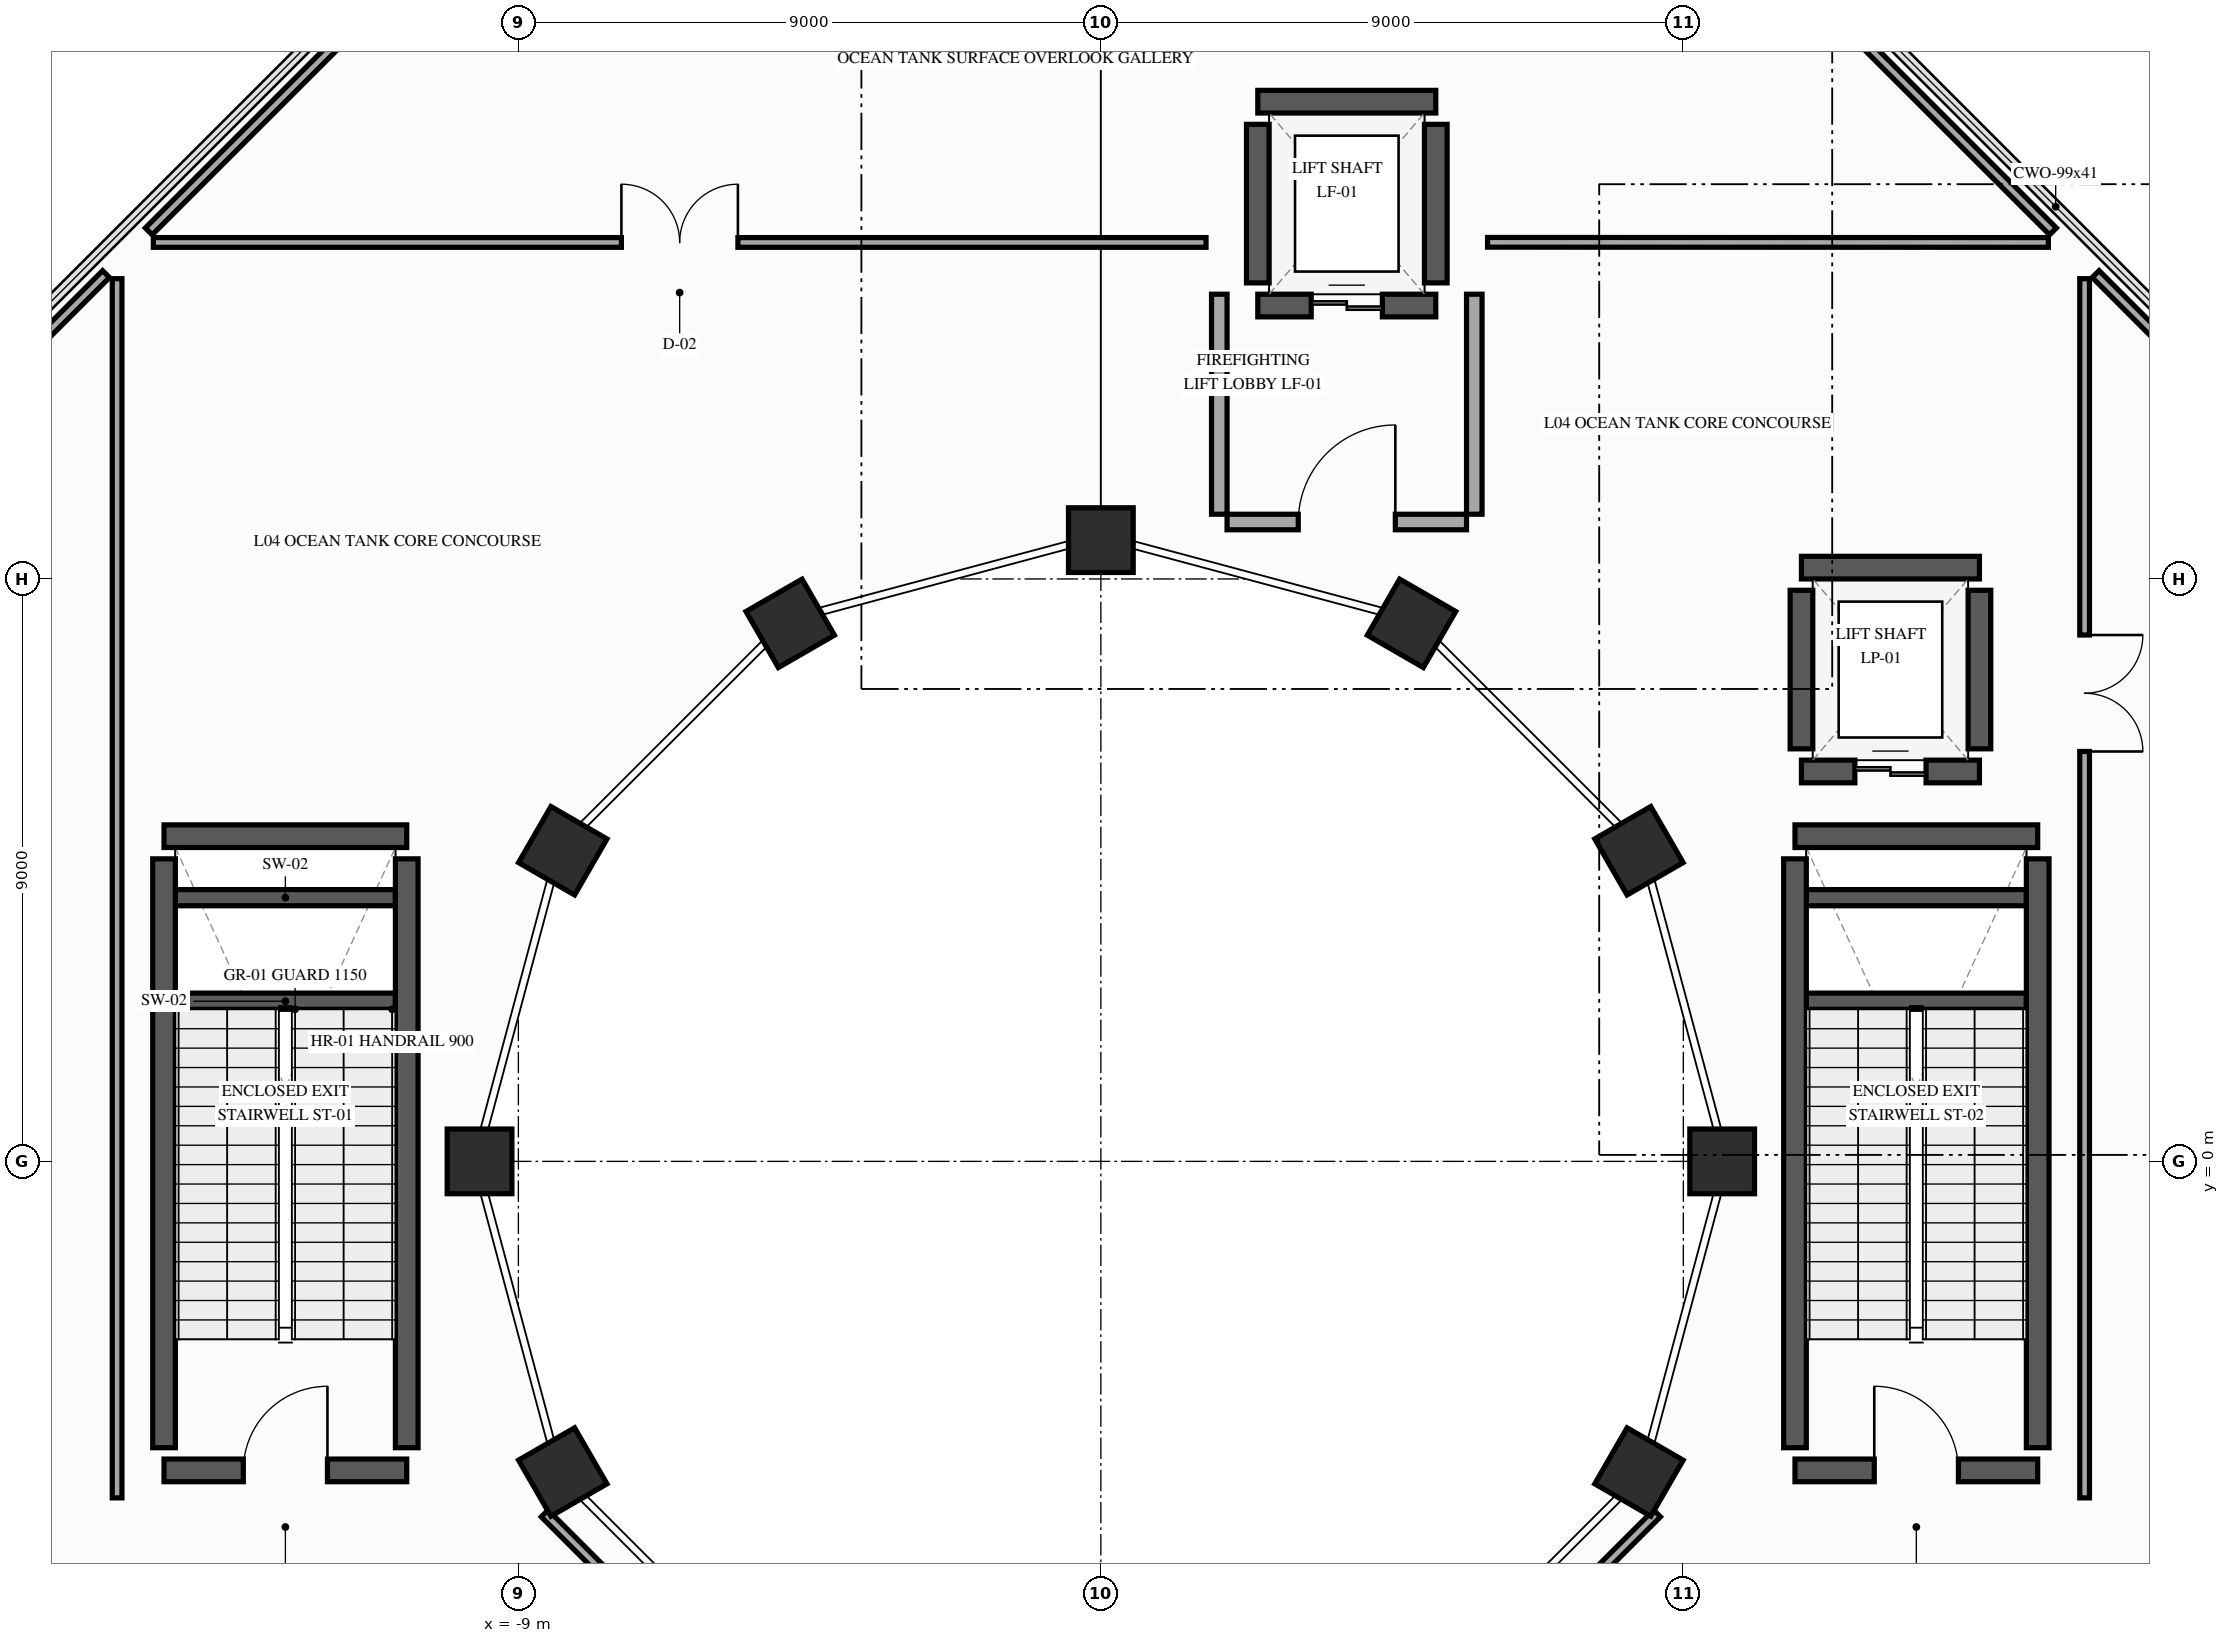
"""IFC4 building model, lengths in metres.
Left out: names, types, materials, properties, quantities, classifications, styles, units other than length and angle.
Written with IfcOpenShell. Run it as: python <this file> out.ifc"""

import sys

from ifc_helpers import new_model, si_unit, direction, frame, frame_2d, origin, origin_2d, place, context, subcontext, project, spatial, rectangle, extrude, element, fill, save


model = new_model("IFC4")
c1 = context("Model", 3, precision=1e-05, world=origin(), true_north=direction((0.0, 1.0)))
c2 = subcontext(c1, "Body", "Model", "MODEL_VIEW")
j1 = project(units=[si_unit("LENGTHUNIT", "METRE"), si_unit("PLANEANGLEUNIT", "RADIAN")], contexts=[c1])
p1 = place(None, origin())
s1 = spatial("IfcSite", under=j1, at=p1, CompositionType="ELEMENT")
p2 = place(p1, origin())
s2 = spatial("IfcBuilding", under=s1, at=p2, CompositionType="ELEMENT")
p3 = place(p2, frame((0.0, 0.0, 21.6)))
s3 = spatial("IfcBuildingStorey", under=s2, at=p3, CompositionType="ELEMENT", Elevation=21.6)
for number, where, z_axis, x_axis in (
    (1, (9.6, 0.0, 0.0), (0.0, 0.0, 1.0), (1.0, 0.0, 0.0)),
    (2, (8.314, 4.8, 0.0), (0.0, 0.0, 1.0), (0.866, 0.5, 0.0)),
    (3, (4.8, 8.314, 0.0), (0.0, 0.0, 1.0), (0.5, 0.866, 0.0)),
    (4, (0.0, 9.6, 0.0), (0.0, 0.0, 1.0), (0.0, 1.0, 0.0)),
    (5, (-4.8, 8.314, 0.0), (0.0, 0.0, 1.0), (-0.5, 0.866, 0.0)),
    (6, (-8.314, 4.8, 0.0), (0.0, 0.0, 1.0), (-0.866, 0.5, 0.0)),
    (7, (-9.6, 0.0, 0.0), (0.0, 0.0, 1.0), (-1.0, 0.0, 0.0)),
    (8, (-8.314, -4.8, 0.0), (0.0, 0.0, 1.0), (-0.866, -0.5, 0.0)),
    (9, (8.314, -4.8, 0.0), (0.0, 0.0, 1.0), (0.866, -0.5, 0.0)),
):
    element("IfcColumn", number, at=place(p3, frame(where, z_axis=z_axis, x_axis=x_axis)), inside=s3, PredefinedType="COLUMN", context=c2, shape_type="SweptSolid", body=[
        extrude(rectangle(XDim=1.0, YDim=1.0, at=origin_2d()), origin(), (0.0, 0.0, 1.0), 5.4),
    ])
for number, where, z_axis, x_axis in (
    (10, (-14.3, 2.475, 0.0), (0.0, 0.0, 1.0), (1.0, 0.0, 0.0)),
    (11, (-14.3, 4.075, 0.0), (0.0, 0.0, 1.0), (1.0, 0.0, 0.0)),
):
    element("IfcWall", number, at=place(p3, frame(where, z_axis=z_axis, x_axis=x_axis)), inside=s3, PredefinedType="SHEAR", context=c2, shape_type="SweptSolid", body=[
        extrude(rectangle(XDim=3.4, YDim=0.25, at=frame_2d((1.7, 0.0))), origin(), (0.0, 0.0, 1.0), 2.5),
    ])
p4 = place(p3, frame((-14.475, -4.775, 0.0), z_axis=(0.0, 0.0, 1.0), x_axis=(1.0, 0.0, 0.0)))
e12 = element("IfcWall", 12, at=p4, inside=s3, PredefinedType="SHEAR", context=c2, shape_type="SweptSolid", body=[
    extrude(rectangle(XDim=3.75, YDim=0.35, at=frame_2d((1.875, 0.0))), origin(), (0.0, 0.0, 1.0), 5.15),
])
p5 = place(p4, frame((1.225, 0.0, 0.0)))
e13 = element("IfcOpeningElement", 13, at=p5, cuts=e12, PredefinedType="OPENING", context=c2, shape_type="SweptSolid", body=[
    extrude(rectangle(XDim=1.3, YDim=2.2, at=frame_2d((0.65, 1.1))), frame((0.0, 0.185, 0.0), z_axis=(0.0, -1.0, 0.0), x_axis=(1.0, 0.0, 0.0)), (0.0, 0.0, 1.0), 0.37),
])
p6 = place(p3, frame((-14.475, 5.025, 0.0), z_axis=(0.0, 0.0, 1.0), x_axis=(1.0, 0.0, 0.0)))
e14 = element("IfcWall", 14, at=p6, inside=s3, PredefinedType="SHEAR", context=c2, shape_type="SweptSolid", body=[
    extrude(rectangle(XDim=3.75, YDim=0.35, at=frame_2d((1.875, 0.0))), origin(), (0.0, 0.0, 1.0), 5.15),
])
for number, where, z_axis, x_axis in (
    (15, (-14.475, -4.425, 0.0), (0.0, 0.0, 1.0), (0.0, 1.0, 0.0)),
    (16, (-10.725, -4.425, 0.0), (0.0, 0.0, 1.0), (0.0, 1.0, 0.0)),
):
    element("IfcWall", number, at=place(p3, frame(where, z_axis=z_axis, x_axis=x_axis)), inside=s3, PredefinedType="SHEAR", context=c2, shape_type="SweptSolid", body=[
        extrude(rectangle(XDim=9.1, YDim=0.35, at=frame_2d((4.55, 0.0))), origin(), (0.0, 0.0, 1.0), 5.15),
    ])
for number, where, z_axis, x_axis in (
    (17, (10.9, 2.475, 0.0), (0.0, 0.0, 1.0), (1.0, 0.0, 0.0)),
    (18, (10.9, 4.075, 0.0), (0.0, 0.0, 1.0), (1.0, 0.0, 0.0)),
):
    element("IfcWall", number, at=place(p3, frame(where, z_axis=z_axis, x_axis=x_axis)), inside=s3, PredefinedType="SHEAR", context=c2, shape_type="SweptSolid", body=[
        extrude(rectangle(XDim=3.4, YDim=0.25, at=frame_2d((1.7, 0.0))), origin(), (0.0, 0.0, 1.0), 2.5),
    ])
p7 = place(p3, frame((10.725, -4.775, 0.0), z_axis=(0.0, 0.0, 1.0), x_axis=(1.0, 0.0, 0.0)))
e19 = element("IfcWall", 19, at=p7, inside=s3, PredefinedType="SHEAR", context=c2, shape_type="SweptSolid", body=[
    extrude(rectangle(XDim=3.75, YDim=0.35, at=frame_2d((1.875, 0.0))), origin(), (0.0, 0.0, 1.0), 5.15),
])
p8 = place(p7, frame((1.225, 0.0, 0.0)))
e20 = element("IfcOpeningElement", 20, at=p8, cuts=e19, PredefinedType="OPENING", context=c2, shape_type="SweptSolid", body=[
    extrude(rectangle(XDim=1.3, YDim=2.2, at=frame_2d((0.65, 1.1))), frame((0.0, 0.185, 0.0), z_axis=(0.0, -1.0, 0.0), x_axis=(1.0, 0.0, 0.0)), (0.0, 0.0, 1.0), 0.37),
])
p9 = place(p3, frame((10.725, 5.025, 0.0), z_axis=(0.0, 0.0, 1.0), x_axis=(1.0, 0.0, 0.0)))
e21 = element("IfcWall", 21, at=p9, inside=s3, PredefinedType="SHEAR", context=c2, shape_type="SweptSolid", body=[
    extrude(rectangle(XDim=3.75, YDim=0.35, at=frame_2d((1.875, 0.0))), origin(), (0.0, 0.0, 1.0), 5.15),
])
for number, where, z_axis, x_axis in (
    (22, (10.725, -4.425, 0.0), (0.0, 0.0, 1.0), (0.0, 1.0, 0.0)),
    (23, (14.475, -4.425, 0.0), (0.0, 0.0, 1.0), (0.0, 1.0, 0.0)),
):
    element("IfcWall", number, at=place(p3, frame(where, z_axis=z_axis, x_axis=x_axis)), inside=s3, PredefinedType="SHEAR", context=c2, shape_type="SweptSolid", body=[
        extrude(rectangle(XDim=9.1, YDim=0.35, at=frame_2d((4.55, 0.0))), origin(), (0.0, 0.0, 1.0), 5.15),
    ])
p10 = place(p3, frame((2.425, 13.225, 0.0), z_axis=(0.0, 0.0, 1.0), x_axis=(1.0, 0.0, 0.0)))
e24 = element("IfcWall", 24, at=p10, inside=s3, PredefinedType="SHEAR", context=c2, shape_type="SweptSolid", body=[
    extrude(rectangle(XDim=2.75, YDim=0.35, at=frame_2d((1.375, 0.0))), origin(), (0.0, 0.0, 1.0), 5.15),
])
p11 = place(p10, frame((0.825, 0.0, 0.0)))
e25 = element("IfcOpeningElement", 25, at=p11, cuts=e24, PredefinedType="OPENING", context=c2, shape_type="SweptSolid", body=[
    extrude(rectangle(XDim=1.1, YDim=2.2, at=frame_2d((0.55, 1.1))), frame((0.0, 0.185, 0.0), z_axis=(0.0, -1.0, 0.0), x_axis=(1.0, 0.0, 0.0)), (0.0, 0.0, 1.0), 0.37),
])
p12 = place(p3, frame((5.175, 16.375, 0.0), z_axis=(0.0, 0.0, 1.0), x_axis=(-1.0, 0.0, 0.0)))
e26 = element("IfcWall", 26, at=p12, inside=s3, PredefinedType="SHEAR", context=c2, shape_type="SweptSolid", body=[
    extrude(rectangle(XDim=2.75, YDim=0.35, at=frame_2d((1.375, 0.0))), origin(), (0.0, 0.0, 1.0), 5.15),
])
for number, where, z_axis, x_axis in (
    (27, (2.425, 13.575, 0.0), (0.0, 0.0, 1.0), (0.0, 1.0, 0.0)),
    (28, (5.175, 13.575, 0.0), (0.0, 0.0, 1.0), (0.0, 1.0, 0.0)),
):
    element("IfcWall", number, at=place(p3, frame(where, z_axis=z_axis, x_axis=x_axis)), inside=s3, PredefinedType="SHEAR", context=c2, shape_type="SweptSolid", body=[
        extrude(rectangle(XDim=2.45, YDim=0.35, at=frame_2d((1.225, 0.0))), origin(), (0.0, 0.0, 1.0), 5.15),
    ])
p13 = place(p3, frame((1.95, 9.88, 0.0), z_axis=(0.0, 0.0, 1.0), x_axis=(1.0, 0.0, 0.0)))
e29 = element("IfcWall", 29, at=p13, inside=s3, PredefinedType="PARTITIONING", context=c2, shape_type="SweptSolid", body=[
    extrude(rectangle(XDim=3.7, YDim=0.24, at=frame_2d((1.85, 0.0))), origin(), (0.0, 0.0, 1.0), 4.535),
])
p14 = place(p13, frame((1.1, 0.0, 0.0)))
e30 = element("IfcOpeningElement", 30, at=p14, cuts=e29, PredefinedType="OPENING", context=c2, shape_type="SweptSolid", body=[
    extrude(rectangle(XDim=1.5, YDim=2.2, at=frame_2d((0.75, 1.1))), frame((0.0, 0.13, 0.0), z_axis=(0.0, -1.0, 0.0), x_axis=(1.0, 0.0, 0.0)), (0.0, 0.0, 1.0), 0.26),
])
p15 = place(p3, frame((1.83, 10.0, 0.0), z_axis=(0.0, 0.0, 1.0), x_axis=(0.0, 1.0, 0.0)))
e31 = element("IfcWall", 31, at=p15, inside=s3, PredefinedType="PARTITIONING", context=c2, shape_type="SweptSolid", body=[
    extrude(rectangle(XDim=3.4, YDim=0.24, at=frame_2d((1.7, 0.0))), origin(), (0.0, 0.0, 1.0), 5.1),
])
p16 = place(p3, frame((5.77, 10.0, 0.0), z_axis=(0.0, 0.0, 1.0), x_axis=(0.0, 1.0, 0.0)))
e32 = element("IfcWall", 32, at=p16, inside=s3, PredefinedType="PARTITIONING", context=c2, shape_type="SweptSolid", body=[
    extrude(rectangle(XDim=3.4, YDim=0.24, at=frame_2d((1.7, 0.0))), origin(), (0.0, 0.0, 1.0), 4.535),
])
p17 = place(p3, frame((10.825, 6.025, 0.0), z_axis=(0.0, 0.0, 1.0), x_axis=(1.0, 0.0, 0.0)))
e33 = element("IfcWall", 33, at=p17, inside=s3, PredefinedType="SHEAR", context=c2, shape_type="SweptSolid", body=[
    extrude(rectangle(XDim=2.75, YDim=0.35, at=frame_2d((1.375, 0.0))), origin(), (0.0, 0.0, 1.0), 5.15),
])
p18 = place(p17, frame((0.825, 0.0, 0.0)))
e34 = element("IfcOpeningElement", 34, at=p18, cuts=e33, PredefinedType="OPENING", context=c2, shape_type="SweptSolid", body=[
    extrude(rectangle(XDim=1.1, YDim=2.2, at=frame_2d((0.55, 1.1))), frame((0.0, 0.185, 0.0), z_axis=(0.0, -1.0, 0.0), x_axis=(1.0, 0.0, 0.0)), (0.0, 0.0, 1.0), 0.37),
])
p19 = place(p3, frame((13.575, 9.175, 0.0), z_axis=(0.0, 0.0, 1.0), x_axis=(-1.0, 0.0, 0.0)))
e35 = element("IfcWall", 35, at=p19, inside=s3, PredefinedType="SHEAR", context=c2, shape_type="SweptSolid", body=[
    extrude(rectangle(XDim=2.75, YDim=0.35, at=frame_2d((1.375, 0.0))), origin(), (0.0, 0.0, 1.0), 5.15),
])
for number, where, z_axis, x_axis in (
    (36, (10.825, 6.375, 0.0), (0.0, 0.0, 1.0), (0.0, 1.0, 0.0)),
    (37, (13.575, 6.375, 0.0), (0.0, 0.0, 1.0), (0.0, 1.0, 0.0)),
):
    element("IfcWall", number, at=place(p3, frame(where, z_axis=z_axis, x_axis=x_axis)), inside=s3, PredefinedType="SHEAR", context=c2, shape_type="SweptSolid", body=[
        extrude(rectangle(XDim=2.45, YDim=0.35, at=frame_2d((1.225, 0.0))), origin(), (0.0, 0.0, 1.0), 5.15),
    ])
p20 = place(p3, frame((17.946, 11.135, 0.0), z_axis=(0.0, 0.0, 1.0), x_axis=(-0.706972707094, 0.707240829862, 0.0)))
e38 = element("IfcWall", 38, at=p20, inside=s3, PredefinedType="PARTITIONING", context=c2, shape_type="SweptSolid", body=[
    extrude(rectangle(XDim=3.642, YDim=0.15, at=frame_2d((1.821, 0.0))), origin(), (0.0, 0.0, 1.0), 4.185),
])
p21 = place(p3, frame((15.2, 13.64, 0.0), z_axis=(0.0, 0.0, 1.0), x_axis=(0.0, -1.0, 0.0)))
e39 = element("IfcWall", 39, at=p21, inside=s3, PredefinedType="PARTITIONING", context=c2, shape_type="SweptSolid", body=[
    extrude(rectangle(XDim=18.84, YDim=0.15, at=frame_2d((9.42, 0.0))), origin(), (0.0, 0.0, 1.0), 4.185),
])
p22 = place(p21, frame((5.506, 0.0, 0.0)))
e40 = element("IfcOpeningElement", 40, at=p22, cuts=e39, PredefinedType="OPENING", context=c2, shape_type="SweptSolid", body=[
    extrude(rectangle(XDim=1.8, YDim=2.3, at=frame_2d((0.9, 1.15))), frame((0.0, 0.085, 0.0), z_axis=(0.0, -1.0, 0.0), x_axis=(1.0, 0.0, 0.0)), (0.0, 0.0, 1.0), 0.17),
])
for number, where, z_axis, x_axis in (
    (41, (8.593, -5.44, 0.0), (0.0, 0.0, 1.0), (-0.707, -0.707, 0.0)),
    (42, (-5.44, -8.593, 0.0), (0.0, 0.0, 1.0), (-0.707, 0.707, 0.0)),
):
    element("IfcWall", number, at=place(p3, frame(where, z_axis=z_axis, x_axis=x_axis)), inside=s3, PredefinedType="PARTITIONING", context=c2, shape_type="SweptSolid", body=[
        extrude(rectangle(XDim=4.459, YDim=0.15, at=frame_2d((2.229, 0.0))), origin(), (0.0, 0.0, 1.0), 4.535),
    ])
p23 = place(p3, frame((-15.2, -5.2, 0.0), z_axis=(0.0, 0.0, 1.0), x_axis=(0.0, 1.0, 0.0)))
e43 = element("IfcWall", 43, at=p23, inside=s3, PredefinedType="PARTITIONING", context=c2, shape_type="SweptSolid", body=[
    extrude(rectangle(XDim=18.84, YDim=0.15, at=frame_2d((9.42, 0.0))), origin(), (0.0, 0.0, 1.0), 4.185),
])
p24 = place(p3, frame((-15.371, 13.711, 0.0), z_axis=(0.0, 0.0, 1.0), x_axis=(-0.706972707094, -0.707240829862, 0.0)))
e44 = element("IfcWall", 44, at=p24, inside=s3, PredefinedType="PARTITIONING", context=c2, shape_type="SweptSolid", body=[
    extrude(rectangle(XDim=3.642, YDim=0.15, at=frame_2d((1.821, 0.0))), origin(), (0.0, 0.0, 1.0), 4.185),
])
p25 = place(p3, frame((-14.64, 14.2, 0.0), z_axis=(0.0, 0.0, 1.0), x_axis=(1.0, 0.0, 0.0)))
e45 = element("IfcWall", 45, at=p25, inside=s3, PredefinedType="PARTITIONING", context=c2, shape_type="SweptSolid", body=[
    extrude(rectangle(XDim=16.265, YDim=0.15, at=frame_2d((8.132, 0.0))), origin(), (0.0, 0.0, 1.0), 4.185),
])
p26 = place(p25, frame((7.232, 0.0, 0.0)))
e46 = element("IfcOpeningElement", 46, at=p26, cuts=e45, PredefinedType="OPENING", context=c2, shape_type="SweptSolid", body=[
    extrude(rectangle(XDim=1.8, YDim=2.3, at=frame_2d((0.9, 1.15))), frame((0.0, 0.085, 0.0), z_axis=(0.0, -1.0, 0.0), x_axis=(1.0, 0.0, 0.0)), (0.0, 0.0, 1.0), 0.17),
])
p27 = place(p3, frame((5.975, 14.202, 0.0), z_axis=(0.0, 0.0, 1.0), x_axis=(0.999999974595, -0.000225409253, 0.0)))
e47 = element("IfcWall", 47, at=p27, inside=s3, PredefinedType="PARTITIONING", context=c2, shape_type="SweptSolid", body=[
    extrude(rectangle(XDim=8.665, YDim=0.15, at=frame_2d((4.333, 0.0))), origin(), (0.0, 0.0, 1.0), 4.185),
])
p28 = place(p3, frame((14.711, 14.371, 0.0), z_axis=(0.0, 0.0, 1.0), x_axis=(-0.707203340899, 0.707010208287, 0.0)))
e48 = element("IfcWall", 48, at=p28, inside=s3, PredefinedType="PARTITIONING", context=c2, shape_type="SweptSolid", body=[
    extrude(rectangle(XDim=5.056, YDim=0.15, at=frame_2d((2.528, 0.0))), origin(), (0.0, 0.0, 1.0), 4.185),
])
p29 = place(p3, frame((-11.136, 17.946, 0.0), z_axis=(0.0, 0.0, 1.0), x_axis=(-0.707106781187, -0.707106781187, 0.0)))
e49 = element("IfcWall", 49, at=p29, inside=s3, PredefinedType="PARTITIONING", context=c2, shape_type="SweptSolid", body=[
    extrude(rectangle(XDim=5.056, YDim=0.15, at=frame_2d((2.528, 0.0))), origin(), (0.0, 0.0, 1.0), 4.185),
])
p30 = place(p5, origin())
e50 = element("IfcDoor", 50, at=p30, inside=s3, OperationType="SINGLE_SWING_RIGHT", PredefinedType="DOOR", context=c2, shape_type="SweptSolid", body=[
    extrude(rectangle(XDim=1.3, YDim=2.2, at=frame_2d((0.65, 1.1))), frame((0.0, 0.025, 0.0), z_axis=(0.0, -1.0, 0.0), x_axis=(1.0, 0.0, 0.0)), (0.0, 0.0, 1.0), 0.05),
])
fill(e13, e50)
p31 = place(p8, origin())
e51 = element("IfcDoor", 51, at=p31, inside=s3, OperationType="SINGLE_SWING_LEFT", PredefinedType="DOOR", context=c2, shape_type="SweptSolid", body=[
    extrude(rectangle(XDim=1.3, YDim=2.2, at=frame_2d((0.65, 1.1))), frame((0.0, 0.025, 0.0), z_axis=(0.0, -1.0, 0.0), x_axis=(1.0, 0.0, 0.0)), (0.0, 0.0, 1.0), 0.05),
])
fill(e20, e51)
p32 = place(p11, origin())
e52 = element("IfcDoor", 52, at=p32, inside=s3, OperationType="DOUBLE_DOOR_SLIDING", PredefinedType="DOOR", context=c2, shape_type="SweptSolid", body=[
    extrude(rectangle(XDim=1.1, YDim=2.2, at=frame_2d((0.55, 1.1))), frame((0.0, 0.025, 0.0), z_axis=(0.0, -1.0, 0.0), x_axis=(1.0, 0.0, 0.0)), (0.0, 0.0, 1.0), 0.05),
])
fill(e25, e52)
p33 = place(p14, origin())
e53 = element("IfcDoor", 53, at=p33, inside=s3, OperationType="SINGLE_SWING_RIGHT", PredefinedType="DOOR", context=c2, shape_type="SweptSolid", body=[
    extrude(rectangle(XDim=1.5, YDim=2.2, at=frame_2d((0.75, 1.1))), frame((0.0, 0.025, 0.0), z_axis=(0.0, -1.0, 0.0), x_axis=(1.0, 0.0, 0.0)), (0.0, 0.0, 1.0), 0.05),
])
fill(e30, e53)
p34 = place(p18, origin())
e54 = element("IfcDoor", 54, at=p34, inside=s3, OperationType="DOUBLE_DOOR_SLIDING", PredefinedType="DOOR", context=c2, shape_type="SweptSolid", body=[
    extrude(rectangle(XDim=1.1, YDim=2.2, at=frame_2d((0.55, 1.1))), frame((0.0, 0.025, 0.0), z_axis=(0.0, -1.0, 0.0), x_axis=(1.0, 0.0, 0.0)), (0.0, 0.0, 1.0), 0.05),
])
fill(e34, e54)
p35 = place(p22, origin())
e55 = element("IfcDoor", 55, at=p35, inside=s3, OperationType="DOUBLE_DOOR_SINGLE_SWING", PredefinedType="DOOR", context=c2, shape_type="SweptSolid", body=[
    extrude(rectangle(XDim=1.8, YDim=2.3, at=frame_2d((0.9, 1.15))), frame((0.0, 0.025, 0.0), z_axis=(0.0, -1.0, 0.0), x_axis=(1.0, 0.0, 0.0)), (0.0, 0.0, 1.0), 0.05),
])
fill(e40, e55)
p36 = place(p26, origin())
e56 = element("IfcDoor", 56, at=p36, inside=s3, OperationType="DOUBLE_DOOR_SINGLE_SWING", PredefinedType="DOOR", context=c2, shape_type="SweptSolid", body=[
    extrude(rectangle(XDim=1.8, YDim=2.3, at=frame_2d((0.9, 1.15))), frame((0.0, 0.025, 0.0), z_axis=(0.0, -1.0, 0.0), x_axis=(1.0, 0.0, 0.0)), (0.0, 0.0, 1.0), 0.05),
])
fill(e46, e56)
save(model, sys.argv[1])
